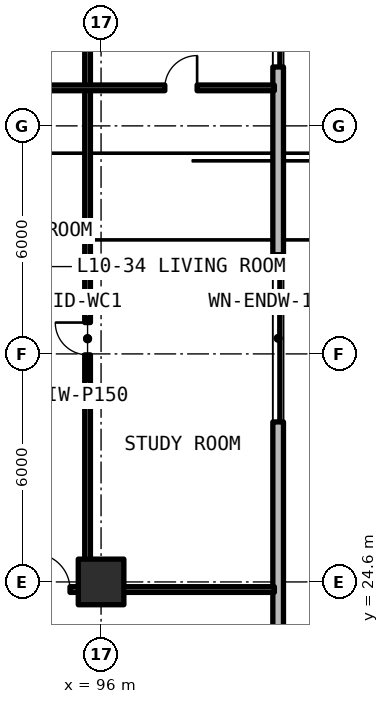
"""IFC4 building model, lengths in metres.
Left out: names, types, materials, properties, quantities, classifications, styles, units other than length and angle.
Written with IfcOpenShell. Run it as: python <this file> out.ifc"""

import sys

from ifc_helpers import new_model, si_unit, direction, frame, frame_2d, origin, origin_2d, place, context, subcontext, project, spatial, rectangle, extrude, element, fill, save


model = new_model("IFC4")
c1 = context("Model", 3, precision=1e-05, world=origin(), true_north=direction((0.0, 1.0)))
c2 = subcontext(c1, "Body", "Model", "MODEL_VIEW")
j1 = project(units=[si_unit("LENGTHUNIT", "METRE"), si_unit("PLANEANGLEUNIT", "RADIAN")], contexts=[c1])
p1 = place(None, origin())
s1 = spatial("IfcSite", under=j1, at=p1, CompositionType="ELEMENT")
p2 = place(p1, origin())
s2 = spatial("IfcBuilding", under=s1, at=p2, CompositionType="ELEMENT")
p3 = place(p2, frame((0.0, 0.0, 38.94)))
s3 = spatial("IfcBuildingStorey", under=s2, at=p3, CompositionType="ELEMENT", Elevation=38.94)
p4 = place(p3, frame((96.0, 24.6, 0.0), z_axis=(0.0, 0.0, 1.0), x_axis=(1.0, 0.0, 0.0)))
e1 = element("IfcColumn", 1, at=p4, inside=s3, PredefinedType="COLUMN", context=c2, shape_type="SweptSolid", body=[
    extrude(rectangle(XDim=1.2, YDim=1.2, at=origin_2d()), origin(), (0.0, 0.0, 1.0), 3.3),
])
p5 = place(p3, frame((100.66, 11.858, 0.0), z_axis=(0.0, 0.0, 1.0), x_axis=(0.0, 1.0, 0.0)))
e2 = element("IfcWall", 2, at=p5, inside=s3, PredefinedType="SOLIDWALL", context=c2, shape_type="SweptSolid", body=[
    extrude(rectangle(XDim=43.484, YDim=0.28, at=frame_2d((21.742, 0.0))), origin(), (0.0, 0.0, 1.0), 3.08),
])
p6 = place(p5, frame((3.442, 0.0, 0.0)))
e3 = element("IfcOpeningElement", 3, at=p6, cuts=e2, PredefinedType="OPENING", context=c2, shape_type="SweptSolid", body=[
    extrude(rectangle(XDim=1.1, YDim=2.15, at=frame_2d((0.55, 1.075))), frame((0.0, 0.15, 0.0), z_axis=(0.0, -1.0, 0.0), x_axis=(1.0, 0.0, 0.0)), (0.0, 0.0, 1.0), 0.3),
])
p7 = place(p5, frame((16.952, 0.0, 0.78)))
e4 = element("IfcOpeningElement", 4, at=p7, cuts=e2, PredefinedType="OPENING", context=c2, shape_type="SweptSolid", body=[
    extrude(rectangle(XDim=4.4, YDim=1.66, at=frame_2d((2.2, 0.83))), frame((0.0, 0.15, 0.0), z_axis=(0.0, -1.0, 0.0), x_axis=(1.0, 0.0, 0.0)), (0.0, 0.0, 1.0), 0.3),
])
p8 = place(p5, frame((26.292, 0.0, 0.78)))
e5 = element("IfcOpeningElement", 5, at=p8, cuts=e2, PredefinedType="OPENING", context=c2, shape_type="SweptSolid", body=[
    extrude(rectangle(XDim=4.4, YDim=1.66, at=frame_2d((2.2, 0.83))), frame((0.0, 0.15, 0.0), z_axis=(0.0, -1.0, 0.0), x_axis=(1.0, 0.0, 0.0)), (0.0, 0.0, 1.0), 0.3),
])
p9 = place(p3, frame((95.645, 24.4, 0.0), z_axis=(0.0, 0.0, 1.0), x_axis=(0.0, 1.0, 0.0)))
e6 = element("IfcWall", 6, at=p9, inside=s3, PredefinedType="PARTITIONING", context=c2, shape_type="SweptSolid", body=[
    extrude(rectangle(XDim=13.2, YDim=0.15, at=frame_2d((6.6, 0.0))), origin(), (0.0, 0.0, 1.0), 2.35),
])
p10 = place(p9, frame((6.175, 0.0, 0.0)))
e7 = element("IfcOpeningElement", 7, at=p10, cuts=e6, PredefinedType="OPENING", context=c2, shape_type="SweptSolid", body=[
    extrude(rectangle(XDim=0.85, YDim=2.1, at=frame_2d((0.425, 1.05))), frame((0.0, 0.085, 0.0), z_axis=(0.0, -1.0, 0.0), x_axis=(1.0, 0.0, 0.0)), (0.0, 0.0, 1.0), 0.17),
])
p11 = place(p3, frame((95.645, 37.6, 0.0), z_axis=(0.0, 0.0, 1.0), x_axis=(0.0, 1.0, 0.0)))
e8 = element("IfcWall", 8, at=p11, inside=s3, PredefinedType="PARTITIONING", context=c2, shape_type="SweptSolid", body=[
    extrude(rectangle(XDim=5.2, YDim=0.15, at=frame_2d((2.6, 0.0))), origin(), (0.0, 0.0, 1.0), 2.35),
])
p12 = place(p3, frame((90.32, 37.6, 0.0), z_axis=(0.0, 0.0, 1.0), x_axis=(1.0, 0.0, 0.0)))
e9 = element("IfcWall", 9, at=p12, inside=s3, PredefinedType="PARTITIONING", context=c2, shape_type="SweptSolid", body=[
    extrude(rectangle(XDim=10.24, YDim=0.15, at=frame_2d((5.12, 0.0))), origin(), (0.0, 0.0, 1.0), 2.35),
])
p13 = place(p12, frame((3.412, 0.0, 0.0)))
e10 = element("IfcOpeningElement", 10, at=p13, cuts=e9, PredefinedType="OPENING", context=c2, shape_type="SweptSolid", body=[
    extrude(rectangle(XDim=0.85, YDim=2.1, at=frame_2d((0.425, 1.05))), frame((0.0, 0.085, 0.0), z_axis=(0.0, -1.0, 0.0), x_axis=(1.0, 0.0, 0.0)), (0.0, 0.0, 1.0), 0.17),
])
p14 = place(p12, frame((7.357, 0.0, 0.0)))
e11 = element("IfcOpeningElement", 11, at=p14, cuts=e9, PredefinedType="OPENING", context=c2, shape_type="SweptSolid", body=[
    extrude(rectangle(XDim=0.85, YDim=2.1, at=frame_2d((0.425, 1.05))), frame((0.0, 0.085, 0.0), z_axis=(0.0, -1.0, 0.0), x_axis=(1.0, 0.0, 0.0)), (0.0, 0.0, 1.0), 0.17),
])
p15 = place(p3, frame((90.32, 24.4, 0.0), z_axis=(0.0, 0.0, 1.0), x_axis=(1.0, 0.0, 0.0)))
e12 = element("IfcWall", 12, at=p15, inside=s3, PredefinedType="SOLIDWALL", context=c2, shape_type="SweptSolid", body=[
    extrude(rectangle(XDim=10.24, YDim=0.15, at=frame_2d((5.12, 0.0))), origin(), (0.0, 0.0, 1.0), 2.295),
])
p16 = place(p15, frame((3.913, 0.0, 0.0)))
e13 = element("IfcOpeningElement", 13, at=p16, cuts=e12, PredefinedType="OPENING", context=c2, shape_type="SweptSolid", body=[
    extrude(rectangle(XDim=0.95, YDim=2.15, at=frame_2d((0.475, 1.075))), frame((0.0, 0.085, 0.0), z_axis=(0.0, -1.0, 0.0), x_axis=(1.0, 0.0, 0.0)), (0.0, 0.0, 1.0), 0.17),
])
p17 = place(p7, origin())
e14 = element("IfcWindow", 14, at=p17, inside=s3, PartitioningType="SINGLE_PANEL", PredefinedType="WINDOW", context=c2, shape_type="SweptSolid", body=[
    extrude(rectangle(XDim=4.4, YDim=1.66, at=frame_2d((2.2, 0.83))), frame((0.0, 0.03, 0.0), z_axis=(0.0, -1.0, 0.0), x_axis=(1.0, 0.0, 0.0)), (0.0, 0.0, 1.0), 0.06),
])
fill(e4, e14)
p18 = place(p8, origin())
e15 = element("IfcWindow", 15, at=p18, inside=s3, PartitioningType="SINGLE_PANEL", PredefinedType="WINDOW", context=c2, shape_type="SweptSolid", body=[
    extrude(rectangle(XDim=4.4, YDim=1.66, at=frame_2d((2.2, 0.83))), frame((0.0, 0.03, 0.0), z_axis=(0.0, -1.0, 0.0), x_axis=(1.0, 0.0, 0.0)), (0.0, 0.0, 1.0), 0.06),
])
fill(e5, e15)
p19 = place(p10, origin())
e16 = element("IfcDoor", 16, at=p19, inside=s3, OperationType="SINGLE_SWING_RIGHT", PredefinedType="DOOR", context=c2, shape_type="SweptSolid", body=[
    extrude(rectangle(XDim=0.85, YDim=2.1, at=frame_2d((0.425, 1.05))), frame((0.0, 0.025, 0.0), z_axis=(0.0, -1.0, 0.0), x_axis=(1.0, 0.0, 0.0)), (0.0, 0.0, 1.0), 0.05),
])
fill(e7, e16)
p20 = place(p14, origin())
e17 = element("IfcDoor", 17, at=p20, inside=s3, OperationType="SINGLE_SWING_RIGHT", PredefinedType="DOOR", context=c2, shape_type="SweptSolid", body=[
    extrude(rectangle(XDim=0.85, YDim=2.1, at=frame_2d((0.425, 1.05))), frame((0.0, 0.025, 0.0), z_axis=(0.0, -1.0, 0.0), x_axis=(1.0, 0.0, 0.0)), (0.0, 0.0, 1.0), 0.05),
])
fill(e11, e17)
p21 = place(p16, origin())
e18 = element("IfcDoor", 18, at=p21, inside=s3, OperationType="SINGLE_SWING_LEFT", PredefinedType="DOOR", context=c2, shape_type="SweptSolid", body=[
    extrude(rectangle(XDim=0.95, YDim=2.15, at=frame_2d((0.475, 1.075))), frame((0.0, 0.025, 0.0), z_axis=(0.0, -1.0, 0.0), x_axis=(1.0, 0.0, 0.0)), (0.0, 0.0, 1.0), 0.05),
])
fill(e13, e18)
save(model, sys.argv[1])
